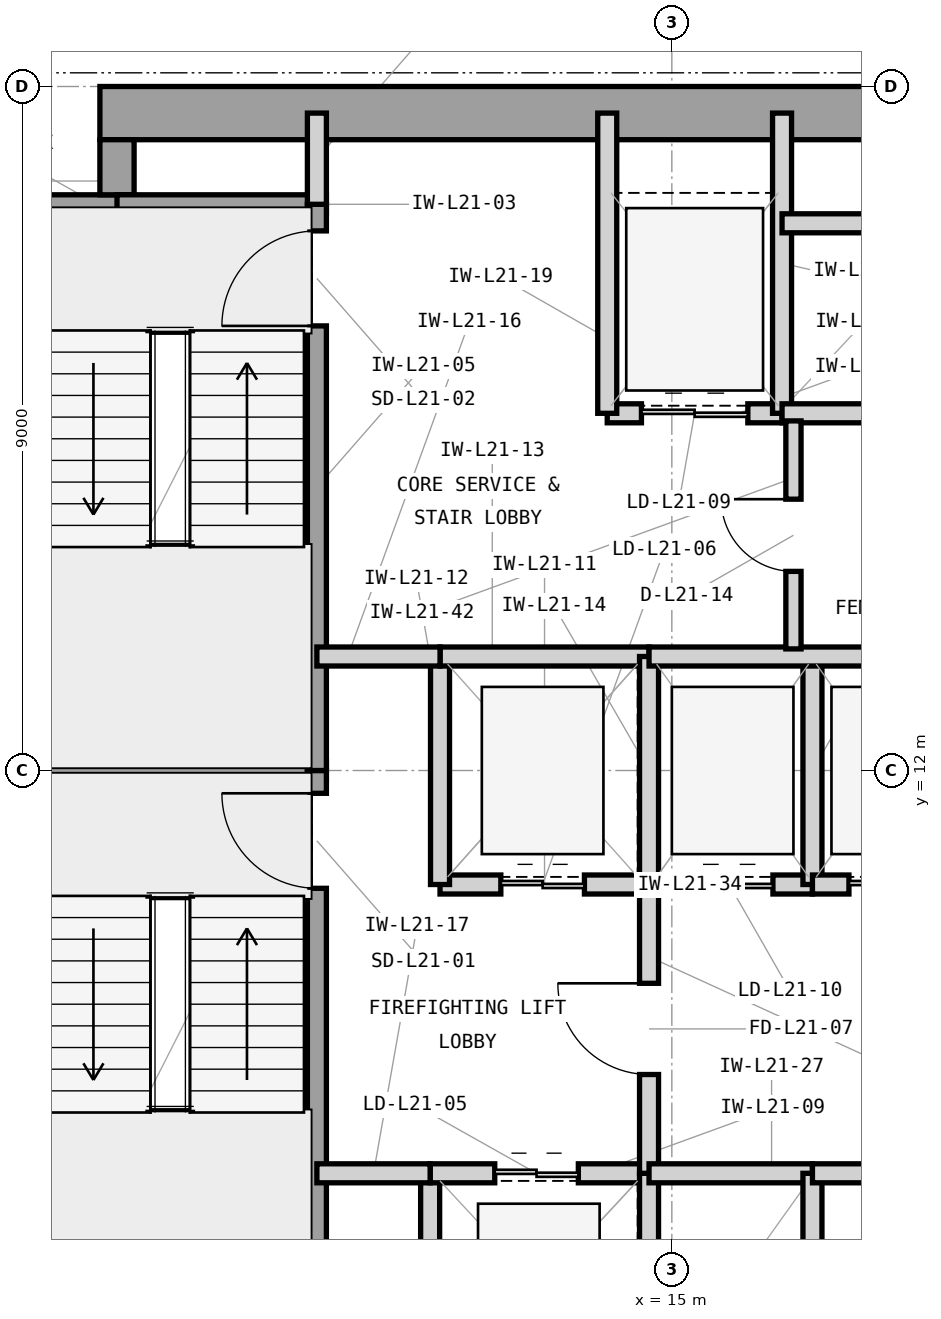
"""IFC4 building model, lengths in metres.
Left out: names, types, materials, properties, quantities, classifications, styles, units other than length and angle.
Written with IfcOpenShell. Run it as: python <this file> out.ifc"""

import sys

from ifc_helpers import new_model, si_unit, direction, frame, frame_2d, origin, place, context, subcontext, project, spatial, rectangle, extrude, element, fill, save


model = new_model("IFC4")
c1 = context("Model", 3, precision=1e-05, world=origin(), true_north=direction((0.0, 1.0)))
c2 = subcontext(c1, "Body", "Model", "MODEL_VIEW")
j1 = project(units=[si_unit("LENGTHUNIT", "METRE"), si_unit("PLANEANGLEUNIT", "RADIAN")], contexts=[c1])
p1 = place(None, origin())
s1 = spatial("IfcSite", under=j1, at=p1, CompositionType="ELEMENT")
p2 = place(p1, origin())
s2 = spatial("IfcBuilding", under=s1, at=p2, CompositionType="ELEMENT")
p3 = place(p2, frame((0.0, 0.0, 93.3)))
s3 = spatial("IfcBuildingStorey", under=s2, at=p3, CompositionType="ELEMENT", Elevation=93.3)
p4 = place(p3, frame((7.475, 20.65, 0.0), z_axis=(0.0, 0.0, 1.0), x_axis=(1.0, 0.0, 0.0)))
e1 = element("IfcWall", 1, at=p4, inside=s3, PredefinedType="SHEAR", context=c2, shape_type="SweptSolid", body=[
    extrude(rectangle(XDim=12.325, YDim=0.7, at=frame_2d((6.163, 0.0))), origin(), (0.0, 0.0, 1.0), 3.9),
])
p5 = place(p3, frame((6.7, 19.35, 0.0), z_axis=(0.0, 0.0, 1.0), x_axis=(1.0, 0.0, 0.0)))
e2 = element("IfcWall", 2, at=p5, inside=s3, PredefinedType="SHEAR", context=c2, shape_type="SweptSolid", body=[
    extrude(rectangle(XDim=1.225, YDim=0.45, at=frame_2d((0.613, 0.0))), origin(), (0.0, 0.0, 1.0), 3.9),
])
p6 = place(p3, frame((7.7, 19.575, 0.0), z_axis=(0.0, 0.0, 1.0), x_axis=(0.0, 1.0, 0.0)))
e3 = element("IfcWall", 3, at=p6, inside=s3, PredefinedType="SHEAR", context=c2, shape_type="SweptSolid", body=[
    extrude(rectangle(XDim=0.725, YDim=0.45, at=frame_2d((0.363, 0.0))), origin(), (0.0, 0.0, 1.0), 3.9),
])
p7 = place(p3, frame((6.35, 12.0, 0.0), z_axis=(0.0, 0.0, 1.0), x_axis=(1.0, 0.0, 0.0)))
e4 = element("IfcWall", 4, at=p7, inside=s3, PredefinedType="SHEAR", context=c2, shape_type="SweptSolid", body=[
    extrude(rectangle(XDim=4.105, YDim=0.25, at=frame_2d((2.052, 0.0))), origin(), (0.0, 0.0, 1.0), 3.9),
])
p8 = place(p3, frame((7.7, 19.45, 0.0), z_axis=(0.0, 0.0, 1.0), x_axis=(1.0, 0.0, 0.0)))
e5 = element("IfcWall", 5, at=p8, inside=s3, PredefinedType="SHEAR", context=c2, shape_type="SweptSolid", body=[
    extrude(rectangle(XDim=2.755, YDim=0.25, at=frame_2d((1.377, 0.0))), origin(), (0.0, 0.0, 1.0), 3.9),
])
p9 = place(p3, frame((10.33, 4.55, 0.0), z_axis=(0.0, 0.0, 1.0), x_axis=(0.0, 1.0, 0.0)))
e6 = element("IfcWall", 6, at=p9, inside=s3, PredefinedType="SHEAR", context=c2, shape_type="SweptSolid", body=[
    extrude(rectangle(XDim=7.45, YDim=0.25, at=frame_2d((3.725, 0.0))), origin(), (0.0, 0.0, 1.0), 3.9),
])
p10 = place(p9, frame((5.9, 0.0, 0.0)))
e7 = element("IfcOpeningElement", 7, at=p10, cuts=e6, PredefinedType="OPENING", context=c2, shape_type="SweptSolid", body=[
    extrude(rectangle(XDim=1.25, YDim=2.2, at=frame_2d((0.625, 1.1))), frame((0.0, 0.135, 0.0), z_axis=(0.0, -1.0, 0.0), x_axis=(1.0, 0.0, 0.0)), (0.0, 0.0, 1.0), 0.27),
])
p11 = place(p3, frame((10.33, 12.0, 0.0), z_axis=(0.0, 0.0, 1.0), x_axis=(0.0, 1.0, 0.0)))
e8 = element("IfcWall", 8, at=p11, inside=s3, PredefinedType="SHEAR", context=c2, shape_type="SweptSolid", body=[
    extrude(rectangle(XDim=7.45, YDim=0.25, at=frame_2d((3.725, 0.0))), origin(), (0.0, 0.0, 1.0), 3.9),
])
p12 = place(p11, frame((5.85, 0.0, 0.0)))
e9 = element("IfcOpeningElement", 9, at=p12, cuts=e8, PredefinedType="OPENING", context=c2, shape_type="SweptSolid", body=[
    extrude(rectangle(XDim=1.25, YDim=2.2, at=frame_2d((0.625, 1.1))), frame((0.0, 0.135, 0.0), z_axis=(0.0, -1.0, 0.0), x_axis=(1.0, 0.0, 0.0)), (0.0, 0.0, 1.0), 0.27),
])
p13 = place(p3, frame((11.82, 3.35, 0.0), z_axis=(0.0, 0.0, 1.0), x_axis=(0.0, 1.0, 0.0)))
e10 = element("IfcWall", 10, at=p13, inside=s3, PredefinedType="PARTITIONING", context=c2, shape_type="SweptSolid", body=[
    extrude(rectangle(XDim=3.35, YDim=0.25, at=frame_2d((1.675, 0.0))), origin(), (0.0, 0.0, 1.0), 3.69),
])
p14 = place(p3, frame((10.33, 19.45, 0.0), z_axis=(0.0, 0.0, 1.0), x_axis=(0.0, 1.0, 0.0)))
e11 = element("IfcWall", 11, at=p14, inside=s3, PredefinedType="PARTITIONING", context=c2, shape_type="SweptSolid", body=[
    extrude(rectangle(XDim=1.2, YDim=0.25, at=frame_2d((0.6, 0.0))), origin(), (0.0, 0.0, 1.0), 2.917),
])
p15 = place(p3, frame((11.82, 6.7, 0.0), z_axis=(0.0, 0.0, 1.0), x_axis=(1.0, 0.0, 0.0)))
e12 = element("IfcWall", 12, at=p15, inside=s3, PredefinedType="PARTITIONING", context=c2, shape_type="SweptSolid", body=[
    extrude(rectangle(XDim=2.88, YDim=0.25, at=frame_2d((1.44, 0.0))), origin(), (0.0, 0.0, 1.0), 3.227),
])
p16 = place(p15, frame((0.85, 0.0, 0.0)))
e13 = element("IfcOpeningElement", 13, at=p16, cuts=e12, PredefinedType="OPENING", context=c2, shape_type="SweptSolid", body=[
    extrude(rectangle(XDim=1.1, YDim=2.25, at=frame_2d((0.55, 1.125))), frame((0.0, 0.135, 0.0), z_axis=(0.0, -1.0, 0.0), x_axis=(1.0, 0.0, 0.0)), (0.0, 0.0, 1.0), 0.27),
])
p17 = place(p3, frame((14.7, 3.35, 0.0), z_axis=(0.0, 0.0, 1.0), x_axis=(0.0, 1.0, 0.0)))
e14 = element("IfcWall", 14, at=p17, inside=s3, PredefinedType="PARTITIONING", context=c2, shape_type="SweptSolid", body=[
    extrude(rectangle(XDim=3.35, YDim=0.25, at=frame_2d((1.675, 0.0))), origin(), (0.0, 0.0, 1.0), 3.69),
])
p18 = place(p3, frame((11.95, 10.5, 0.0), z_axis=(0.0, 0.0, 1.0), x_axis=(1.0, 0.0, 0.0)))
e15 = element("IfcWall", 15, at=p18, inside=s3, PredefinedType="PARTITIONING", context=c2, shape_type="SweptSolid", body=[
    extrude(rectangle(XDim=2.75, YDim=0.25, at=frame_2d((1.375, 0.0))), origin(), (0.0, 0.0, 1.0), 3.227),
])
p19 = place(p18, frame((0.8, 0.0, 0.0)))
e16 = element("IfcOpeningElement", 16, at=p19, cuts=e15, PredefinedType="OPENING", context=c2, shape_type="SweptSolid", body=[
    extrude(rectangle(XDim=1.1, YDim=2.25, at=frame_2d((0.55, 1.125))), frame((0.0, 0.135, 0.0), z_axis=(0.0, -1.0, 0.0), x_axis=(1.0, 0.0, 0.0)), (0.0, 0.0, 1.0), 0.27),
])
p20 = place(p3, frame((11.95, 10.5, 0.0), z_axis=(0.0, 0.0, 1.0), x_axis=(0.0, 1.0, 0.0)))
e17 = element("IfcWall", 17, at=p20, inside=s3, PredefinedType="PARTITIONING", context=c2, shape_type="SweptSolid", body=[
    extrude(rectangle(XDim=3.0, YDim=0.25, at=frame_2d((1.5, 0.0))), origin(), (0.0, 0.0, 1.0), 3.69),
])
p21 = place(p3, frame((11.95, 13.5, 0.0), z_axis=(0.0, 0.0, 1.0), x_axis=(1.0, 0.0, 0.0)))
e18 = element("IfcWall", 18, at=p21, inside=s3, PredefinedType="PARTITIONING", context=c2, shape_type="SweptSolid", body=[
    extrude(rectangle(XDim=2.75, YDim=0.25, at=frame_2d((1.375, 0.0))), origin(), (0.0, 0.0, 1.0), 3.227),
])
p22 = place(p3, frame((14.7, 10.5, 0.0), z_axis=(0.0, 0.0, 1.0), x_axis=(0.0, 1.0, 0.0)))
e19 = element("IfcWall", 19, at=p22, inside=s3, PredefinedType="PARTITIONING", context=c2, shape_type="SweptSolid", body=[
    extrude(rectangle(XDim=3.0, YDim=0.25, at=frame_2d((1.5, 0.0))), origin(), (0.0, 0.0, 1.0), 3.69),
])
p23 = place(p3, frame((14.7, 6.7, 0.0), z_axis=(0.0, 0.0, 1.0), x_axis=(0.0, 1.0, 0.0)))
e20 = element("IfcWall", 20, at=p23, inside=s3, PredefinedType="PARTITIONING", context=c2, shape_type="SweptSolid", body=[
    extrude(rectangle(XDim=3.8, YDim=0.25, at=frame_2d((1.9, 0.0))), origin(), (0.0, 0.0, 1.0), 3.69),
])
p24 = place(p23, frame((1.3, 0.0, 0.0)))
e21 = element("IfcOpeningElement", 21, at=p24, cuts=e20, PredefinedType="OPENING", context=c2, shape_type="SweptSolid", body=[
    extrude(rectangle(XDim=1.2, YDim=2.2, at=frame_2d((0.6, 1.1))), frame((0.0, 0.135, 0.0), z_axis=(0.0, -1.0, 0.0), x_axis=(1.0, 0.0, 0.0)), (0.0, 0.0, 1.0), 0.27),
])
p25 = place(p3, frame((10.33, 13.5, 0.0), z_axis=(0.0, 0.0, 1.0), x_axis=(1.0, 0.0, 0.0)))
e22 = element("IfcWall", 22, at=p25, inside=s3, PredefinedType="PARTITIONING", context=c2, shape_type="SweptSolid", body=[
    extrude(rectangle(XDim=1.62, YDim=0.25, at=frame_2d((0.81, 0.0))), origin(), (0.0, 0.0, 1.0), 3.227),
])
p26 = place(p3, frame((10.33, 6.7, 0.0), z_axis=(0.0, 0.0, 1.0), x_axis=(1.0, 0.0, 0.0)))
e23 = element("IfcWall", 23, at=p26, inside=s3, PredefinedType="PARTITIONING", context=c2, shape_type="SweptSolid", body=[
    extrude(rectangle(XDim=1.49, YDim=0.25, at=frame_2d((0.745, 0.0))), origin(), (0.0, 0.0, 1.0), 3.227),
])
p27 = place(p3, frame((14.15, 16.7, 0.0), z_axis=(0.0, 0.0, 1.0), x_axis=(1.0, 0.0, 0.0)))
e24 = element("IfcWall", 24, at=p27, inside=s3, PredefinedType="PARTITIONING", context=c2, shape_type="SweptSolid", body=[
    extrude(rectangle(XDim=2.3, YDim=0.25, at=frame_2d((1.15, 0.0))), origin(), (0.0, 0.0, 1.0), 3.227),
])
p28 = place(p27, frame((0.45, 0.0, 0.0)))
e25 = element("IfcOpeningElement", 25, at=p28, cuts=e24, PredefinedType="OPENING", context=c2, shape_type="SweptSolid", body=[
    extrude(rectangle(XDim=1.4, YDim=2.35, at=frame_2d((0.7, 1.175))), frame((0.0, 0.135, 0.0), z_axis=(0.0, -1.0, 0.0), x_axis=(1.0, 0.0, 0.0)), (0.0, 0.0, 1.0), 0.27),
])
for number, where, z_axis, x_axis in (
    (26, (14.15, 16.7, 0.0), (0.0, 0.0, 1.0), (0.0, 1.0, 0.0)),
    (27, (16.45, 16.7, 0.0), (0.0, 0.0, 1.0), (0.0, 1.0, 0.0)),
):
    element("IfcWall", number, at=place(p3, frame(where, z_axis=z_axis, x_axis=x_axis)), inside=s3, PredefinedType="PARTITIONING", context=c2, shape_type="SweptSolid", body=[
        extrude(rectangle(XDim=3.95, YDim=0.25, at=frame_2d((1.975, 0.0))), origin(), (0.0, 0.0, 1.0), 3.69),
    ])
p29 = place(p3, frame((16.45, 16.7, 0.0), z_axis=(0.0, 0.0, 1.0), x_axis=(1.0, 0.0, 0.0)))
e28 = element("IfcWall", 28, at=p29, inside=s3, PredefinedType="PARTITIONING", context=c2, shape_type="SweptSolid", body=[
    extrude(rectangle(XDim=2.3, YDim=0.25, at=frame_2d((1.15, 0.0))), origin(), (0.0, 0.0, 1.0), 3.227),
])
p30 = place(p3, frame((16.45, 19.2, 0.0), z_axis=(0.0, 0.0, 1.0), x_axis=(1.0, 0.0, 0.0)))
e29 = element("IfcWall", 29, at=p30, inside=s3, PredefinedType="PARTITIONING", context=c2, shape_type="SweptSolid", body=[
    extrude(rectangle(XDim=7.2, YDim=0.25, at=frame_2d((3.6, 0.0))), origin(), (0.0, 0.0, 1.0), 3.69),
])
p31 = place(p3, frame((14.7, 6.7, 0.0), z_axis=(0.0, 0.0, 1.0), x_axis=(1.0, 0.0, 0.0)))
e30 = element("IfcWall", 30, at=p31, inside=s3, PredefinedType="PARTITIONING", context=c2, shape_type="SweptSolid", body=[
    extrude(rectangle(XDim=2.15, YDim=0.25, at=frame_2d((1.075, 0.0))), origin(), (0.0, 0.0, 1.0), 3.227),
])
p32 = place(p3, frame((16.85, 3.35, 0.0), z_axis=(0.0, 0.0, 1.0), x_axis=(0.0, 1.0, 0.0)))
e31 = element("IfcWall", 31, at=p32, inside=s3, PredefinedType="PARTITIONING", context=c2, shape_type="SweptSolid", body=[
    extrude(rectangle(XDim=3.35, YDim=0.25, at=frame_2d((1.675, 0.0))), origin(), (0.0, 0.0, 1.0), 3.69),
])
p33 = place(p3, frame((16.85, 6.7, 0.0), z_axis=(0.0, 0.0, 1.0), x_axis=(1.0, 0.0, 0.0)))
e32 = element("IfcWall", 32, at=p33, inside=s3, PredefinedType="PARTITIONING", context=c2, shape_type="SweptSolid", body=[
    extrude(rectangle(XDim=2.1, YDim=0.25, at=frame_2d((1.05, 0.0))), origin(), (0.0, 0.0, 1.0), 3.227),
])
p34 = place(p3, frame((14.7, 10.5, 0.0), z_axis=(0.0, 0.0, 1.0), x_axis=(1.0, 0.0, 0.0)))
e33 = element("IfcWall", 33, at=p34, inside=s3, PredefinedType="PARTITIONING", context=c2, shape_type="SweptSolid", body=[
    extrude(rectangle(XDim=2.15, YDim=0.25, at=frame_2d((1.075, 0.0))), origin(), (0.0, 0.0, 1.0), 3.227),
])
p35 = place(p34, frame((0.48, 0.0, 0.0)))
e34 = element("IfcOpeningElement", 34, at=p35, cuts=e33, PredefinedType="OPENING", context=c2, shape_type="SweptSolid", body=[
    extrude(rectangle(XDim=1.15, YDim=2.25, at=frame_2d((0.575, 1.125))), frame((0.0, 0.135, 0.0), z_axis=(0.0, -1.0, 0.0), x_axis=(1.0, 0.0, 0.0)), (0.0, 0.0, 1.0), 0.27),
])
p36 = place(p3, frame((16.85, 10.5, 0.0), z_axis=(0.0, 0.0, 1.0), x_axis=(0.0, 1.0, 0.0)))
e35 = element("IfcWall", 35, at=p36, inside=s3, PredefinedType="PARTITIONING", context=c2, shape_type="SweptSolid", body=[
    extrude(rectangle(XDim=3.0, YDim=0.25, at=frame_2d((1.5, 0.0))), origin(), (0.0, 0.0, 1.0), 3.69),
])
p37 = place(p3, frame((16.85, 10.5, 0.0), z_axis=(0.0, 0.0, 1.0), x_axis=(1.0, 0.0, 0.0)))
e36 = element("IfcWall", 36, at=p37, inside=s3, PredefinedType="PARTITIONING", context=c2, shape_type="SweptSolid", body=[
    extrude(rectangle(XDim=2.1, YDim=0.25, at=frame_2d((1.05, 0.0))), origin(), (0.0, 0.0, 1.0), 3.227),
])
p38 = place(p37, frame((0.48, 0.0, 0.0)))
e37 = element("IfcOpeningElement", 37, at=p38, cuts=e36, PredefinedType="OPENING", context=c2, shape_type="SweptSolid", body=[
    extrude(rectangle(XDim=1.15, YDim=2.25, at=frame_2d((0.575, 1.125))), frame((0.0, 0.135, 0.0), z_axis=(0.0, -1.0, 0.0), x_axis=(1.0, 0.0, 0.0)), (0.0, 0.0, 1.0), 0.27),
])
p39 = place(p3, frame((14.7, 13.5, 0.0), z_axis=(0.0, 0.0, 1.0), x_axis=(1.0, 0.0, 0.0)))
e38 = element("IfcWall", 38, at=p39, inside=s3, PredefinedType="PARTITIONING", context=c2, shape_type="SweptSolid", body=[
    extrude(rectangle(XDim=8.95, YDim=0.25, at=frame_2d((4.475, 0.0))), origin(), (0.0, 0.0, 1.0), 3.227),
])
p40 = place(p3, frame((16.6, 13.6, 0.0), z_axis=(0.0, 0.0, 1.0), x_axis=(0.0, 1.0, 0.0)))
e39 = element("IfcWall", 39, at=p40, inside=s3, PredefinedType="PARTITIONING", context=c2, shape_type="SweptSolid", body=[
    extrude(rectangle(XDim=3.0, YDim=0.2, at=frame_2d((1.5, 0.0))), origin(), (0.0, 0.0, 1.0), 3.69),
])
p41 = place(p40, frame((1.02, 0.0, 0.0)))
e40 = element("IfcOpeningElement", 40, at=p41, cuts=e39, PredefinedType="OPENING", context=c2, shape_type="SweptSolid", body=[
    extrude(rectangle(XDim=0.95, YDim=2.1, at=frame_2d((0.475, 1.05))), frame((0.0, 0.11, 0.0), z_axis=(0.0, -1.0, 0.0), x_axis=(1.0, 0.0, 0.0)), (0.0, 0.0, 1.0), 0.22),
])
p42 = place(p10, origin())
e41 = element("IfcDoor", 41, at=p42, inside=s3, OperationType="SINGLE_SWING_RIGHT", PredefinedType="DOOR", context=c2, shape_type="SweptSolid", body=[
    extrude(rectangle(XDim=1.25, YDim=2.2, at=frame_2d((0.625, 1.1))), frame((0.0, 0.025, 0.0), z_axis=(0.0, -1.0, 0.0), x_axis=(1.0, 0.0, 0.0)), (0.0, 0.0, 1.0), 0.05),
])
fill(e7, e41)
p43 = place(p12, origin())
e42 = element("IfcDoor", 42, at=p43, inside=s3, OperationType="SINGLE_SWING_LEFT", PredefinedType="DOOR", context=c2, shape_type="SweptSolid", body=[
    extrude(rectangle(XDim=1.25, YDim=2.2, at=frame_2d((0.625, 1.1))), frame((0.0, 0.025, 0.0), z_axis=(0.0, -1.0, 0.0), x_axis=(1.0, 0.0, 0.0)), (0.0, 0.0, 1.0), 0.05),
])
fill(e9, e42)
p44 = place(p16, origin())
e43 = element("IfcDoor", 43, at=p44, inside=s3, OperationType="DOUBLE_DOOR_SLIDING", PredefinedType="DOOR", context=c2, shape_type="SweptSolid", body=[
    extrude(rectangle(XDim=1.1, YDim=2.25, at=frame_2d((0.55, 1.125))), frame((0.0, 0.025, 0.0), z_axis=(0.0, -1.0, 0.0), x_axis=(1.0, 0.0, 0.0)), (0.0, 0.0, 1.0), 0.05),
])
fill(e13, e43)
p45 = place(p19, origin())
e44 = element("IfcDoor", 44, at=p45, inside=s3, OperationType="DOUBLE_DOOR_SLIDING", PredefinedType="DOOR", context=c2, shape_type="SweptSolid", body=[
    extrude(rectangle(XDim=1.1, YDim=2.25, at=frame_2d((0.55, 1.125))), frame((0.0, 0.025, 0.0), z_axis=(0.0, -1.0, 0.0), x_axis=(1.0, 0.0, 0.0)), (0.0, 0.0, 1.0), 0.05),
])
fill(e16, e44)
p46 = place(p24, origin())
e45 = element("IfcDoor", 45, at=p46, inside=s3, OperationType="SINGLE_SWING_RIGHT", PredefinedType="DOOR", context=c2, shape_type="SweptSolid", body=[
    extrude(rectangle(XDim=1.2, YDim=2.2, at=frame_2d((0.6, 1.1))), frame((0.0, 0.025, 0.0), z_axis=(0.0, -1.0, 0.0), x_axis=(1.0, 0.0, 0.0)), (0.0, 0.0, 1.0), 0.05),
])
fill(e21, e45)
p47 = place(p28, origin())
e46 = element("IfcDoor", 46, at=p47, inside=s3, OperationType="DOUBLE_DOOR_SLIDING", PredefinedType="DOOR", context=c2, shape_type="SweptSolid", body=[
    extrude(rectangle(XDim=1.4, YDim=2.35, at=frame_2d((0.7, 1.175))), frame((0.0, 0.025, 0.0), z_axis=(0.0, -1.0, 0.0), x_axis=(1.0, 0.0, 0.0)), (0.0, 0.0, 1.0), 0.05),
])
fill(e25, e46)
p48 = place(p35, origin())
e47 = element("IfcDoor", 47, at=p48, inside=s3, OperationType="DOUBLE_DOOR_SLIDING", PredefinedType="DOOR", context=c2, shape_type="SweptSolid", body=[
    extrude(rectangle(XDim=1.15, YDim=2.25, at=frame_2d((0.575, 1.125))), frame((0.0, 0.025, 0.0), z_axis=(0.0, -1.0, 0.0), x_axis=(1.0, 0.0, 0.0)), (0.0, 0.0, 1.0), 0.05),
])
fill(e34, e47)
p49 = place(p38, origin())
e48 = element("IfcDoor", 48, at=p49, inside=s3, OperationType="DOUBLE_DOOR_SLIDING", PredefinedType="DOOR", context=c2, shape_type="SweptSolid", body=[
    extrude(rectangle(XDim=1.15, YDim=2.25, at=frame_2d((0.575, 1.125))), frame((0.0, 0.025, 0.0), z_axis=(0.0, -1.0, 0.0), x_axis=(1.0, 0.0, 0.0)), (0.0, 0.0, 1.0), 0.05),
])
fill(e37, e48)
p50 = place(p41, origin())
e49 = element("IfcDoor", 49, at=p50, inside=s3, OperationType="SINGLE_SWING_RIGHT", PredefinedType="DOOR", context=c2, shape_type="SweptSolid", body=[
    extrude(rectangle(XDim=0.95, YDim=2.1, at=frame_2d((0.475, 1.05))), frame((0.0, 0.025, 0.0), z_axis=(0.0, -1.0, 0.0), x_axis=(1.0, 0.0, 0.0)), (0.0, 0.0, 1.0), 0.05),
])
fill(e40, e49)
save(model, sys.argv[1])
